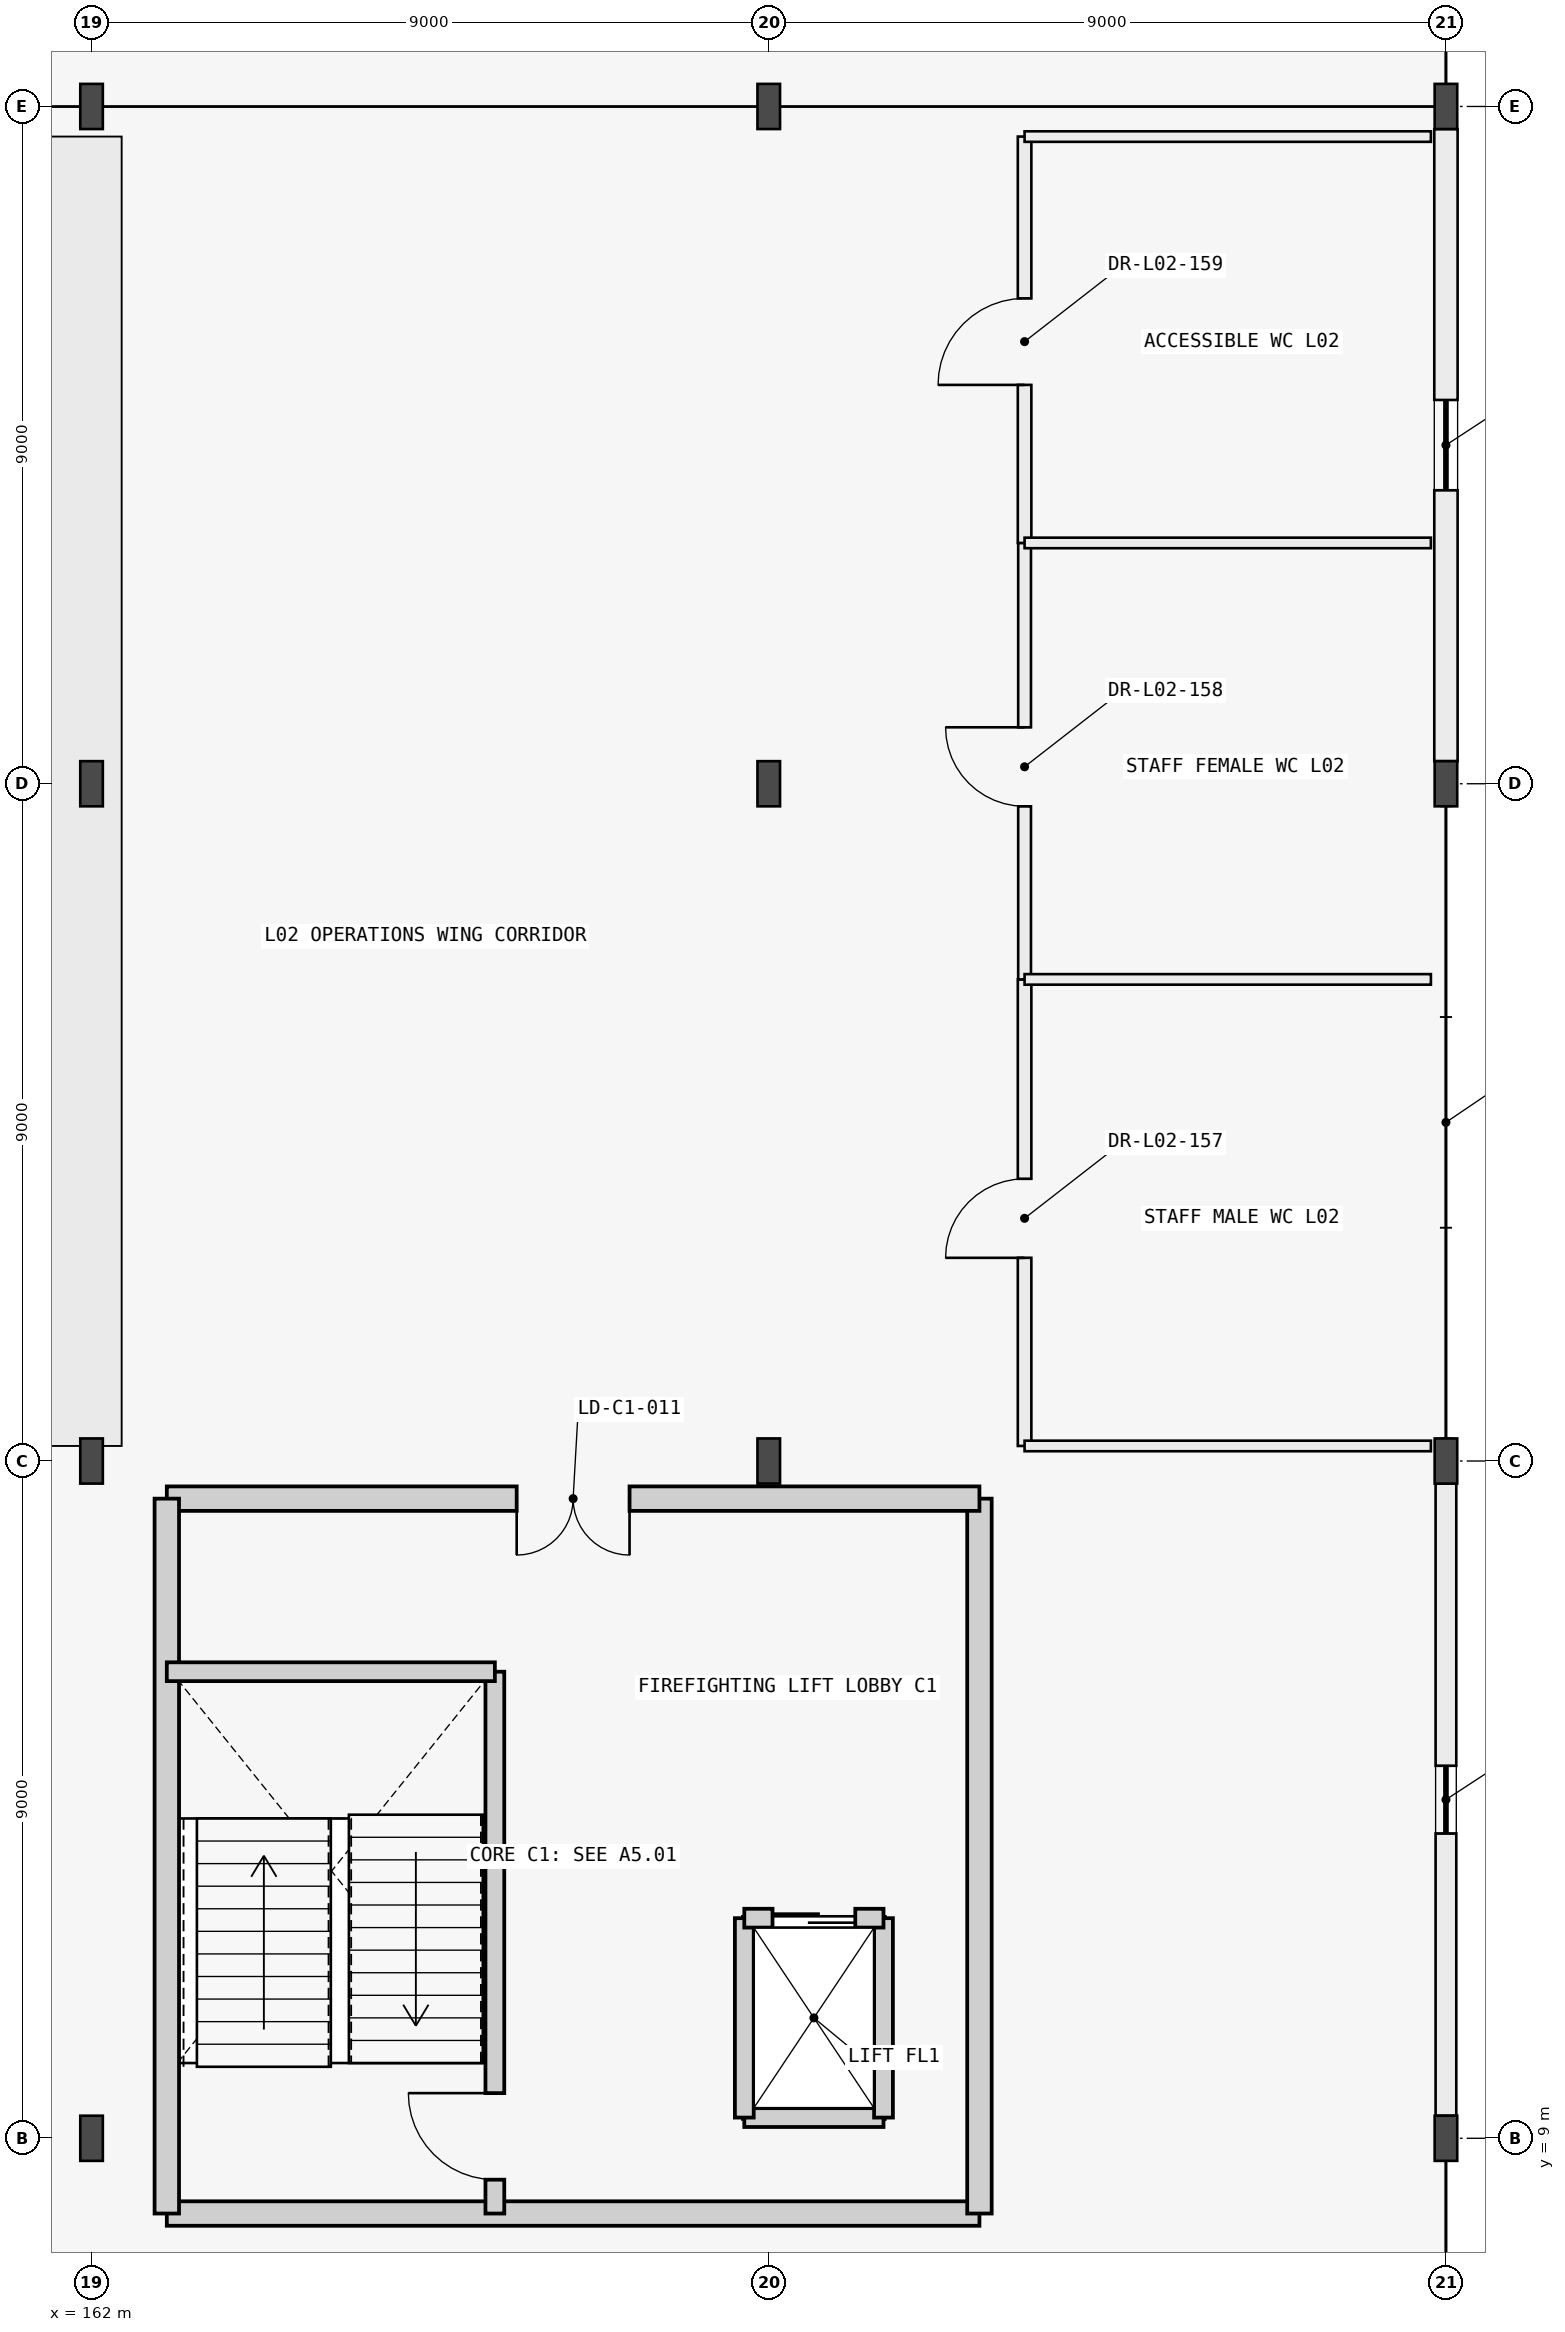
"""IFC4 building model, lengths in metres.
Left out: names, types, materials, properties, quantities, classifications, styles, units other than length and angle.
Written with IfcOpenShell. Run it as: python <this file> out.ifc"""

import sys

from ifc_helpers import new_model, si_unit, direction, frame, frame_2d, origin, origin_2d, place, context, subcontext, project, spatial, rectangle, i_section, extrude, element, fill, save


model = new_model("IFC4")
c1 = context("Model", 3, precision=1e-05, world=origin(), true_north=direction((0.0, 1.0)))
c2 = subcontext(c1, "Body", "Model", "MODEL_VIEW")
j1 = project(units=[si_unit("LENGTHUNIT", "METRE"), si_unit("PLANEANGLEUNIT", "RADIAN")], contexts=[c1])
p1 = place(None, origin())
s1 = spatial("IfcSite", under=j1, at=p1, CompositionType="ELEMENT")
p2 = place(p1, origin())
s2 = spatial("IfcBuilding", under=s1, at=p2, CompositionType="ELEMENT")
p3 = place(p2, frame((0.0, 0.0, 8.4)))
s3 = spatial("IfcBuildingStorey", under=s2, at=p3, CompositionType="ELEMENT", Elevation=8.4)
for number, where, z_axis, x_axis in (
    (1, (162.0, 9.0, 0.0), (0.0, 0.0, 1.0), (1.0, 0.0, 0.0)),
    (2, (180.0, 9.0, 0.0), (0.0, 0.0, 1.0), (1.0, 0.0, 0.0)),
    (3, (162.0, 18.0, 0.0), (0.0, 0.0, 1.0), (1.0, 0.0, 0.0)),
    (4, (171.0, 18.0, 0.0), (0.0, 0.0, 1.0), (1.0, 0.0, 0.0)),
    (5, (180.0, 18.0, 0.0), (0.0, 0.0, 1.0), (1.0, 0.0, 0.0)),
    (6, (162.0, 27.0, 0.0), (0.0, 0.0, 1.0), (1.0, 0.0, 0.0)),
    (7, (171.0, 27.0, 0.0), (0.0, 0.0, 1.0), (1.0, 0.0, 0.0)),
    (8, (180.0, 27.0, 0.0), (0.0, 0.0, 1.0), (1.0, 0.0, 0.0)),
    (9, (162.0, 36.0, 0.0), (0.0, 0.0, 1.0), (1.0, 0.0, 0.0)),
    (10, (171.0, 36.0, 0.0), (0.0, 0.0, 1.0), (1.0, 0.0, 0.0)),
    (11, (180.0, 36.0, 0.0), (0.0, 0.0, 1.0), (1.0, 0.0, 0.0)),
):
    element("IfcColumn", number, at=place(p3, frame(where, z_axis=z_axis, x_axis=x_axis)), inside=s3, PredefinedType="COLUMN", context=c2, shape_type="SweptSolid", body=[
        extrude(i_section(OverallWidth=0.3, OverallDepth=0.6, WebThickness=0.015, FlangeThickness=0.03, FilletRadius=0.027, at=origin_2d()), origin(), (0.0, 0.0, 1.0), 4.2),
    ])
p4 = place(p3, frame((180.0, 9.3, 0.0), z_axis=(0.0, 0.0, 1.0), x_axis=(0.0, 1.0, 0.0)))
e12 = element("IfcWall", 12, at=p4, inside=s3, PredefinedType="POLYGONAL", context=c2, shape_type="SweptSolid", body=[
    extrude(rectangle(XDim=8.4, YDim=0.275, at=frame_2d((4.2, 0.0))), origin(), (0.0, 0.0, 1.0), 3.61),
])
p5 = place(p4, frame((3.75, 0.0, 0.95)))
e13 = element("IfcOpeningElement", 13, at=p5, cuts=e12, PredefinedType="OPENING", context=c2, shape_type="SweptSolid", body=[
    extrude(rectangle(XDim=0.9, YDim=1.2, at=frame_2d((0.45, 0.6))), frame((0.0, 0.147, 0.0), z_axis=(0.0, -1.0, 0.0), x_axis=(1.0, 0.0, 0.0)), (0.0, 0.0, 1.0), 0.295),
])
p6 = place(p3, frame((180.0, 27.3, 0.0), z_axis=(0.0, 0.0, 1.0), x_axis=(0.0, 1.0, 0.0)))
e14 = element("IfcWall", 14, at=p6, inside=s3, PredefinedType="STANDARD", context=c2, shape_type="SweptSolid", body=[
    extrude(rectangle(XDim=8.4, YDim=0.31, at=frame_2d((4.2, 0.0))), origin(), (0.0, 0.0, 1.0), 3.61),
])
p7 = place(p6, frame((3.6, 0.0, 0.95)))
e15 = element("IfcOpeningElement", 15, at=p7, cuts=e14, PredefinedType="OPENING", context=c2, shape_type="SweptSolid", body=[
    extrude(rectangle(XDim=1.2, YDim=1.35, at=frame_2d((0.6, 0.675))), frame((0.0, 0.165, 0.0), z_axis=(0.0, -1.0, 0.0), x_axis=(1.0, 0.0, 0.0)), (0.0, 0.0, 1.0), 0.33),
])
p8 = place(p3, frame((163.0, 8.0, 0.0), z_axis=(0.0, 0.0, 1.0), x_axis=(1.0, 0.0, 0.0)))
e16 = element("IfcWall", 16, at=p8, inside=s3, PredefinedType="SHEAR", context=c2, shape_type="SweptSolid", body=[
    extrude(rectangle(XDim=10.8, YDim=0.325, at=frame_2d((5.4, 0.0))), origin(), (0.0, 0.0, 1.0), 3.935),
])
p9 = place(p3, frame((173.8, 8.0, 0.0), z_axis=(0.0, 0.0, 1.0), x_axis=(0.0, 1.0, 0.0)))
e17 = element("IfcWall", 17, at=p9, inside=s3, PredefinedType="SHEAR", context=c2, shape_type="SweptSolid", body=[
    extrude(rectangle(XDim=9.5, YDim=0.325, at=frame_2d((4.75, 0.0))), origin(), (0.0, 0.0, 1.0), 3.935),
])
p10 = place(p3, frame((173.8, 17.5, 0.0), z_axis=(0.0, 0.0, 1.0), x_axis=(-1.0, 0.0, 0.0)))
e18 = element("IfcWall", 18, at=p10, inside=s3, PredefinedType="SHEAR", context=c2, shape_type="SweptSolid", body=[
    extrude(rectangle(XDim=10.8, YDim=0.325, at=frame_2d((5.4, 0.0))), origin(), (0.0, 0.0, 1.0), 3.935),
])
p11 = place(p10, frame((4.65, 0.0, 0.0)))
e19 = element("IfcOpeningElement", 19, at=p11, cuts=e18, PredefinedType="OPENING", context=c2, shape_type="SweptSolid", body=[
    extrude(rectangle(XDim=1.5, YDim=2.2, at=frame_2d((0.75, 1.1))), frame((0.0, 0.172, 0.0), z_axis=(0.0, -1.0, 0.0), x_axis=(1.0, 0.0, 0.0)), (0.0, 0.0, 1.0), 0.345),
])
p12 = place(p3, frame((163.0, 17.5, 0.0), z_axis=(0.0, 0.0, 1.0), x_axis=(0.0, -1.0, 0.0)))
e20 = element("IfcWall", 20, at=p12, inside=s3, PredefinedType="SHEAR", context=c2, shape_type="SweptSolid", body=[
    extrude(rectangle(XDim=9.5, YDim=0.325, at=frame_2d((4.75, 0.0))), origin(), (0.0, 0.0, 1.0), 3.935),
])
p13 = place(p3, frame((167.36, 8.0, 0.0), z_axis=(0.0, 0.0, 1.0), x_axis=(0.0, 1.0, 0.0)))
e21 = element("IfcWall", 21, at=p13, inside=s3, PredefinedType="SHEAR", context=c2, shape_type="SweptSolid", body=[
    extrude(rectangle(XDim=7.2, YDim=0.25, at=frame_2d((3.6, 0.0))), origin(), (0.0, 0.0, 1.0), 3.935),
])
p14 = place(p13, frame((0.45, 0.0, 0.0)))
e22 = element("IfcOpeningElement", 22, at=p14, cuts=e21, PredefinedType="OPENING", context=c2, shape_type="SweptSolid", body=[
    extrude(rectangle(XDim=1.15, YDim=2.15, at=frame_2d((0.575, 1.075))), frame((0.0, 0.135, 0.0), z_axis=(0.0, -1.0, 0.0), x_axis=(1.0, 0.0, 0.0)), (0.0, 0.0, 1.0), 0.27),
])
p15 = place(p3, frame((163.0, 15.2, 0.0), z_axis=(0.0, 0.0, 1.0), x_axis=(1.0, 0.0, 0.0)))
e23 = element("IfcWall", 23, at=p15, inside=s3, PredefinedType="SHEAR", context=c2, shape_type="SweptSolid", body=[
    extrude(rectangle(XDim=4.36, YDim=0.25, at=frame_2d((2.18, 0.0))), origin(), (0.0, 0.0, 1.0), 3.935),
])
p16 = place(p3, frame((170.675, 9.275, 0.0), z_axis=(0.0, 0.0, 1.0), x_axis=(1.0, 0.0, 0.0)))
e24 = element("IfcWall", 24, at=p16, inside=s3, PredefinedType="SHEAR", context=c2, shape_type="SweptSolid", body=[
    extrude(rectangle(XDim=1.85, YDim=0.25, at=frame_2d((0.925, 0.0))), origin(), (0.0, 0.0, 1.0), 3.935),
])
for number, where, z_axis, x_axis in (
    (25, (170.675, 9.275, 0.0), (0.0, 0.0, 1.0), (0.0, 1.0, 0.0)),
    (26, (172.525, 9.275, 0.0), (0.0, 0.0, 1.0), (0.0, 1.0, 0.0)),
):
    element("IfcWall", number, at=place(p3, frame(where, z_axis=z_axis, x_axis=x_axis)), inside=s3, PredefinedType="SHEAR", context=c2, shape_type="SweptSolid", body=[
        extrude(rectangle(XDim=2.65, YDim=0.25, at=frame_2d((1.325, 0.0))), origin(), (0.0, 0.0, 1.0), 3.935),
    ])
p17 = place(p3, frame((170.675, 11.925, 0.0), z_axis=(0.0, 0.0, 1.0), x_axis=(1.0, 0.0, 0.0)))
e27 = element("IfcWall", 27, at=p17, inside=s3, PredefinedType="SHEAR", context=c2, shape_type="SweptSolid", body=[
    extrude(rectangle(XDim=1.85, YDim=0.25, at=frame_2d((0.925, 0.0))), origin(), (0.0, 0.0, 1.0), 3.935),
])
p18 = place(p17, frame((0.375, 0.0, 0.0)))
e28 = element("IfcOpeningElement", 28, at=p18, cuts=e27, PredefinedType="OPENING", context=c2, shape_type="SweptSolid", body=[
    extrude(rectangle(XDim=1.1, YDim=2.15, at=frame_2d((0.55, 1.075))), frame((0.0, 0.135, 0.0), z_axis=(0.0, -1.0, 0.0), x_axis=(1.0, 0.0, 0.0)), (0.0, 0.0, 1.0), 0.27),
])
p19 = place(p3, frame((174.4, 18.2, 0.0), z_axis=(0.0, 0.0, 1.0), x_axis=(0.0, 1.0, 0.0)))
e29 = element("IfcWall", 29, at=p19, inside=s3, PredefinedType="PARTITIONING", context=c2, shape_type="SweptSolid", body=[
    extrude(rectangle(XDim=6.2, YDim=0.18, at=frame_2d((3.1, 0.0))), origin(), (0.0, 0.0, 1.0), 3.61),
])
p20 = place(p19, frame((2.5, 0.0, 0.0)))
e30 = element("IfcOpeningElement", 30, at=p20, cuts=e29, PredefinedType="OPENING", context=c2, shape_type="SweptSolid", body=[
    extrude(rectangle(XDim=1.05, YDim=2.1, at=frame_2d((0.525, 1.05))), frame((0.0, 0.1, 0.0), z_axis=(0.0, -1.0, 0.0), x_axis=(1.0, 0.0, 0.0)), (0.0, 0.0, 1.0), 0.2),
])
p21 = place(p3, frame((174.4, 24.4, 0.0), z_axis=(0.0, 0.0, 1.0), x_axis=(0.0, 1.0, 0.0)))
e31 = element("IfcWall", 31, at=p21, inside=s3, PredefinedType="PARTITIONING", context=c2, shape_type="SweptSolid", body=[
    extrude(rectangle(XDim=5.8, YDim=0.17, at=frame_2d((2.9, 0.0))), origin(), (0.0, 0.0, 1.0), 3.61),
])
p22 = place(p21, frame((2.3, 0.0, 0.0)))
e32 = element("IfcOpeningElement", 32, at=p22, cuts=e31, PredefinedType="OPENING", context=c2, shape_type="SweptSolid", body=[
    extrude(rectangle(XDim=1.05, YDim=2.1, at=frame_2d((0.525, 1.05))), frame((0.0, 0.095, 0.0), z_axis=(0.0, -1.0, 0.0), x_axis=(1.0, 0.0, 0.0)), (0.0, 0.0, 1.0), 0.19),
])
p23 = place(p3, frame((174.4, 30.2, 0.0), z_axis=(0.0, 0.0, 1.0), x_axis=(0.0, 1.0, 0.0)))
e33 = element("IfcWall", 33, at=p23, inside=s3, PredefinedType="PARTITIONING", context=c2, shape_type="SweptSolid", body=[
    extrude(rectangle(XDim=5.4, YDim=0.18, at=frame_2d((2.7, 0.0))), origin(), (0.0, 0.0, 1.0), 3.61),
])
p24 = place(p23, frame((2.1, 0.0, 0.0)))
e34 = element("IfcOpeningElement", 34, at=p24, cuts=e33, PredefinedType="OPENING", context=c2, shape_type="SweptSolid", body=[
    extrude(rectangle(XDim=1.15, YDim=2.15, at=frame_2d((0.575, 1.075))), frame((0.0, 0.1, 0.0), z_axis=(0.0, -1.0, 0.0), x_axis=(1.0, 0.0, 0.0)), (0.0, 0.0, 1.0), 0.2),
])
p25 = place(p3, frame((174.4, 18.2, 0.0), z_axis=(0.0, 0.0, 1.0), x_axis=(1.0, 0.0, 0.0)))
e35 = element("IfcWall", 35, at=p25, inside=s3, PredefinedType="PARTITIONING", context=c2, shape_type="SweptSolid", body=[
    extrude(rectangle(XDim=5.4, YDim=0.14, at=frame_2d((2.7, 0.0))), origin(), (0.0, 0.0, 1.0), 3.41),
])
for number, where, z_axis, x_axis in (
    (36, (174.4, 24.4, 0.0), (0.0, 0.0, 1.0), (1.0, 0.0, 0.0)),
    (37, (174.4, 30.2, 0.0), (0.0, 0.0, 1.0), (1.0, 0.0, 0.0)),
):
    element("IfcWall", number, at=place(p3, frame(where, z_axis=z_axis, x_axis=x_axis)), inside=s3, PredefinedType="PARTITIONING", context=c2, shape_type="SweptSolid", body=[
        extrude(rectangle(XDim=5.4, YDim=0.14, at=frame_2d((2.7, 0.0))), origin(), (0.0, 0.0, 1.0), 3.935),
    ])
p26 = place(p3, frame((174.4, 35.6, 0.0), z_axis=(0.0, 0.0, 1.0), x_axis=(1.0, 0.0, 0.0)))
e38 = element("IfcWall", 38, at=p26, inside=s3, PredefinedType="PARTITIONING", context=c2, shape_type="SweptSolid", body=[
    extrude(rectangle(XDim=5.4, YDim=0.14, at=frame_2d((2.7, 0.0))), origin(), (0.0, 0.0, 1.0), 3.41),
])
p27 = place(p5, origin())
e39 = element("IfcWindow", 39, at=p27, inside=s3, PartitioningType="SINGLE_PANEL", PredefinedType="WINDOW", context=c2, shape_type="SweptSolid", body=[
    extrude(rectangle(XDim=0.9, YDim=1.2, at=frame_2d((0.45, 0.6))), frame((0.0, 0.03, 0.0), z_axis=(0.0, -1.0, 0.0), x_axis=(1.0, 0.0, 0.0)), (0.0, 0.0, 1.0), 0.06),
])
fill(e13, e39)
p28 = place(p7, origin())
e40 = element("IfcWindow", 40, at=p28, inside=s3, PartitioningType="SINGLE_PANEL", PredefinedType="WINDOW", context=c2, shape_type="SweptSolid", body=[
    extrude(rectangle(XDim=1.2, YDim=1.35, at=frame_2d((0.6, 0.675))), frame((0.0, 0.03, 0.0), z_axis=(0.0, -1.0, 0.0), x_axis=(1.0, 0.0, 0.0)), (0.0, 0.0, 1.0), 0.06),
])
fill(e15, e40)
p29 = place(p14, origin())
e41 = element("IfcDoor", 41, at=p29, inside=s3, OperationType="SINGLE_SWING_RIGHT", PredefinedType="DOOR", context=c2, shape_type="SweptSolid", body=[
    extrude(rectangle(XDim=1.15, YDim=2.15, at=frame_2d((0.575, 1.075))), frame((0.0, 0.025, 0.0), z_axis=(0.0, -1.0, 0.0), x_axis=(1.0, 0.0, 0.0)), (0.0, 0.0, 1.0), 0.05),
])
fill(e22, e41)
p30 = place(p11, origin())
e42 = element("IfcDoor", 42, at=p30, inside=s3, OperationType="DOUBLE_DOOR_SINGLE_SWING", PredefinedType="DOOR", context=c2, shape_type="SweptSolid", body=[
    extrude(rectangle(XDim=1.5, YDim=2.2, at=frame_2d((0.75, 1.1))), frame((0.0, 0.025, 0.0), z_axis=(0.0, -1.0, 0.0), x_axis=(1.0, 0.0, 0.0)), (0.0, 0.0, 1.0), 0.05),
])
fill(e19, e42)
p31 = place(p18, origin())
e43 = element("IfcDoor", 43, at=p31, inside=s3, OperationType="DOUBLE_DOOR_SLIDING", PredefinedType="USERDEFINED", context=c2, shape_type="SweptSolid", body=[
    extrude(rectangle(XDim=1.1, YDim=2.15, at=frame_2d((0.55, 1.075))), frame((0.0, 0.025, 0.0), z_axis=(0.0, -1.0, 0.0), x_axis=(1.0, 0.0, 0.0)), (0.0, 0.0, 1.0), 0.05),
])
fill(e28, e43)
p32 = place(p20, origin())
e44 = element("IfcDoor", 44, at=p32, inside=s3, OperationType="SINGLE_SWING_LEFT", PredefinedType="DOOR", context=c2, shape_type="SweptSolid", body=[
    extrude(rectangle(XDim=1.05, YDim=2.1, at=frame_2d((0.525, 1.05))), frame((0.0, 0.025, 0.0), z_axis=(0.0, -1.0, 0.0), x_axis=(1.0, 0.0, 0.0)), (0.0, 0.0, 1.0), 0.05),
])
fill(e30, e44)
p33 = place(p22, origin())
e45 = element("IfcDoor", 45, at=p33, inside=s3, OperationType="SINGLE_SWING_RIGHT", PredefinedType="DOOR", context=c2, shape_type="SweptSolid", body=[
    extrude(rectangle(XDim=1.05, YDim=2.1, at=frame_2d((0.525, 1.05))), frame((0.0, 0.025, 0.0), z_axis=(0.0, -1.0, 0.0), x_axis=(1.0, 0.0, 0.0)), (0.0, 0.0, 1.0), 0.05),
])
fill(e32, e45)
p34 = place(p24, origin())
e46 = element("IfcDoor", 46, at=p34, inside=s3, OperationType="SINGLE_SWING_LEFT", PredefinedType="DOOR", context=c2, shape_type="SweptSolid", body=[
    extrude(rectangle(XDim=1.15, YDim=2.15, at=frame_2d((0.575, 1.075))), frame((0.0, 0.025, 0.0), z_axis=(0.0, -1.0, 0.0), x_axis=(1.0, 0.0, 0.0)), (0.0, 0.0, 1.0), 0.05),
])
fill(e34, e46)
save(model, sys.argv[1])
